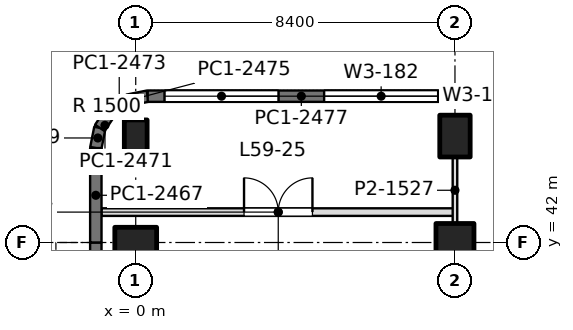
"""IFC4 building model, lengths in metres.
Left out: names, types, materials, properties, quantities, classifications, styles, units other than length and angle.
Written with IfcOpenShell. Run it as: python <this file> out.ifc"""

import sys

from ifc_helpers import new_model, si_unit, direction, frame, frame_2d, origin, origin_2d, place, context, subcontext, project, spatial, rectangle, extrude, element, fill, save


model = new_model("IFC4")
c1 = context("Model", 3, precision=1e-05, world=origin(), true_north=direction((0.0, 1.0)))
c2 = subcontext(c1, "Body", "Model", "MODEL_VIEW")
j1 = project(units=[si_unit("LENGTHUNIT", "METRE"), si_unit("PLANEANGLEUNIT", "RADIAN")], contexts=[c1])
p1 = place(None, origin())
s1 = spatial("IfcSite", under=j1, at=p1, CompositionType="ELEMENT")
p2 = place(p1, origin())
s2 = spatial("IfcBuilding", under=s1, at=p2, CompositionType="ELEMENT")
p3 = place(p2, frame((0.0, 0.0, 259.2)))
s3 = spatial("IfcBuildingStorey", under=s2, at=p3, CompositionType="ELEMENT", Elevation=259.2)
p4 = place(p3, frame((0.0, 42.0, 0.0), z_axis=(0.0, 0.0, 1.0), x_axis=(0.0, 1.0, 0.0)))
e1 = element("IfcColumn", 1, at=p4, inside=s3, PredefinedType="COLUMN", context=c2, shape_type="SweptSolid", body=[
    extrude(rectangle(XDim=0.8, YDim=1.1, at=origin_2d()), origin(), (0.0, 0.0, 1.0), 4.5),
])
p5 = place(p3, frame((0.0, 44.8, 0.0), z_axis=(0.0, 0.0, 1.0), x_axis=(1.0, 0.0, 0.0)))
e2 = element("IfcColumn", 2, at=p5, inside=s3, PredefinedType="COLUMN", context=c2, shape_type="SweptSolid", body=[
    extrude(rectangle(XDim=0.6, YDim=0.85, at=origin_2d()), origin(), (0.0, 0.0, 1.0), 4.5),
])
p6 = place(p3, frame((8.4, 42.0, 0.0), z_axis=(0.0, 0.0, 1.0), x_axis=(1.0, 0.0, 0.0)))
e3 = element("IfcColumn", 3, at=p6, inside=s3, PredefinedType="COLUMN", context=c2, shape_type="SweptSolid", body=[
    extrude(rectangle(XDim=1.0, YDim=1.0, at=origin_2d()), origin(), (0.0, 0.0, 1.0), 4.5),
])
p7 = place(p3, frame((8.4, 44.8, 0.0), z_axis=(0.0, 0.0, 1.0), x_axis=(1.0, 0.0, 0.0)))
e4 = element("IfcColumn", 4, at=p7, inside=s3, PredefinedType="COLUMN", context=c2, shape_type="SweptSolid", body=[
    extrude(rectangle(XDim=0.8, YDim=1.1, at=origin_2d()), origin(), (0.0, 0.0, 1.0), 4.5),
])
p8 = place(p3, frame((-1.05, 37.65, 0.0), z_axis=(0.0, 0.0, 1.0), x_axis=(0.0, 1.0, 0.0)))
e5 = element("IfcWall", 5, at=p8, inside=s3, PredefinedType="SOLIDWALL", context=c2, shape_type="SweptSolid", body=[
    extrude(rectangle(XDim=4.35, YDim=0.3, at=frame_2d((2.175, 0.0))), origin(), (0.0, 0.0, 1.0), 4.35),
])
p9 = place(p8, frame((0.975, 0.0, 0.9)))
e6 = element("IfcOpeningElement", 6, at=p9, cuts=e5, PredefinedType="OPENING", context=c2, shape_type="SweptSolid", body=[
    extrude(rectangle(XDim=2.4, YDim=1.9, at=frame_2d((1.2, 0.95))), frame((0.0, 0.16, 0.0), z_axis=(0.0, -1.0, 0.0), x_axis=(1.0, 0.0, 0.0)), (0.0, 0.0, 1.0), 0.32),
])
p10 = place(p3, frame((-1.05, 42.0, 0.0), z_axis=(0.0, 0.0, 1.0), x_axis=(0.0, 1.0, 0.0)))
e7 = element("IfcWall", 7, at=p10, inside=s3, PredefinedType="SOLIDWALL", context=c2, shape_type="SweptSolid", body=[
    extrude(rectangle(XDim=2.485, YDim=0.3, at=frame_2d((1.243, 0.0))), origin(), (0.0, 0.0, 1.0), 4.35),
])
p11 = place(p3, frame((-1.05, 44.485, 0.0), z_axis=(0.0, 0.0, 1.0), x_axis=(0.195073962632, 0.980788534345, 0.0)))
e8 = element("IfcWall", 8, at=p11, inside=s3, PredefinedType="SOLIDWALL", context=c2, shape_type="SweptSolid", body=[
    extrude(rectangle(XDim=0.541, YDim=0.3, at=frame_2d((0.271, 0.0))), origin(), (0.0, 0.0, 1.0), 4.35),
])
p12 = place(p3, frame((-0.945, 45.015, 0.0), z_axis=(0.0, 0.0, 1.0), x_axis=(0.55534295404, 0.831621430339, 0.0)))
e9 = element("IfcWall", 9, at=p12, inside=s3, PredefinedType="SOLIDWALL", context=c2, shape_type="SweptSolid", body=[
    extrude(rectangle(XDim=0.526, YDim=0.3, at=frame_2d((0.263, 0.0))), origin(), (0.0, 0.0, 1.0), 4.35),
])
p13 = place(p3, frame((-0.653, 45.453, 0.0), z_axis=(0.0, 0.0, 1.0), x_axis=(0.831692711774, 0.555236195849, 0.0)))
e10 = element("IfcWall", 10, at=p13, inside=s3, PredefinedType="SOLIDWALL", context=c2, shape_type="SweptSolid", body=[
    extrude(rectangle(XDim=0.525, YDim=0.3, at=frame_2d((0.263, 0.0))), origin(), (0.0, 0.0, 1.0), 4.35),
])
p14 = place(p3, frame((-0.216, 45.744, 0.0), z_axis=(0.0, 0.0, 1.0), x_axis=(0.980702050465, 0.1955082817, 0.0)))
e11 = element("IfcWall", 11, at=p14, inside=s3, PredefinedType="SOLIDWALL", context=c2, shape_type="SweptSolid", body=[
    extrude(rectangle(XDim=0.541, YDim=0.3, at=frame_2d((0.271, 0.0))), origin(), (0.0, 0.0, 1.0), 4.35),
])
p15 = place(p3, frame((0.315, 45.85, 0.0), z_axis=(0.0, 0.0, 1.0), x_axis=(1.0, 0.0, 0.0)))
e12 = element("IfcWall", 12, at=p15, inside=s3, PredefinedType="SOLIDWALL", context=c2, shape_type="SweptSolid", body=[
    extrude(rectangle(XDim=8.085, YDim=0.3, at=frame_2d((4.042, 0.0))), origin(), (0.0, 0.0, 1.0), 4.35),
])
p16 = place(p15, frame((0.443, 0.0, 0.9)))
e13 = element("IfcOpeningElement", 13, at=p16, cuts=e12, PredefinedType="OPENING", context=c2, shape_type="SweptSolid", body=[
    extrude(rectangle(XDim=3.0, YDim=2.4, at=frame_2d((1.5, 1.2))), frame((0.0, 0.16, 0.0), z_axis=(0.0, -1.0, 0.0), x_axis=(1.0, 0.0, 0.0)), (0.0, 0.0, 1.0), 0.32),
])
p17 = place(p15, frame((4.643, 0.0, 0.9)))
e14 = element("IfcOpeningElement", 14, at=p17, cuts=e12, PredefinedType="OPENING", context=c2, shape_type="SweptSolid", body=[
    extrude(rectangle(XDim=3.0, YDim=2.4, at=frame_2d((1.5, 1.2))), frame((0.0, 0.16, 0.0), z_axis=(0.0, -1.0, 0.0), x_axis=(1.0, 0.0, 0.0)), (0.0, 0.0, 1.0), 0.32),
])
p18 = place(p3, frame((8.4, 45.85, 0.0), z_axis=(0.0, 0.0, 1.0), x_axis=(1.0, 0.0, 0.0)))
e15 = element("IfcWall", 15, at=p18, inside=s3, PredefinedType="SOLIDWALL", context=c2, shape_type="SweptSolid", body=[
    extrude(rectangle(XDim=8.4, YDim=0.3, at=frame_2d((4.2, 0.0))), origin(), (0.0, 0.0, 1.0), 4.35),
])
p19 = place(p18, frame((0.6, 0.0, 0.9)))
e16 = element("IfcOpeningElement", 16, at=p19, cuts=e15, PredefinedType="OPENING", context=c2, shape_type="SweptSolid", body=[
    extrude(rectangle(XDim=3.0, YDim=2.4, at=frame_2d((1.5, 1.2))), frame((0.0, 0.16, 0.0), z_axis=(0.0, -1.0, 0.0), x_axis=(1.0, 0.0, 0.0)), (0.0, 0.0, 1.0), 0.32),
])
p20 = place(p18, frame((4.8, 0.0, 0.9)))
e17 = element("IfcOpeningElement", 17, at=p20, cuts=e15, PredefinedType="OPENING", context=c2, shape_type="SweptSolid", body=[
    extrude(rectangle(XDim=3.0, YDim=2.4, at=frame_2d((1.5, 1.2))), frame((0.0, 0.16, 0.0), z_axis=(0.0, -1.0, 0.0), x_axis=(1.0, 0.0, 0.0)), (0.0, 0.0, 1.0), 0.32),
])
p21 = place(p3, frame((-0.902, 42.8, 0.0), z_axis=(0.0, 0.0, 1.0), x_axis=(1.0, 0.0, 0.0)))
e18 = element("IfcWall", 18, at=p21, inside=s3, PredefinedType="PARTITIONING", context=c2, shape_type="SweptSolid", body=[
    extrude(rectangle(XDim=9.302, YDim=0.2, at=frame_2d((4.651, 0.0))), origin(), (0.0, 0.0, 1.0), 3.86),
])
p22 = place(p21, frame((3.752, 0.0, 0.0)))
e19 = element("IfcOpeningElement", 19, at=p22, cuts=e18, PredefinedType="OPENING", context=c2, shape_type="SweptSolid", body=[
    extrude(rectangle(XDim=1.8, YDim=2.2, at=frame_2d((0.9, 1.1))), frame((0.0, 0.11, 0.0), z_axis=(0.0, -1.0, 0.0), x_axis=(1.0, 0.0, 0.0)), (0.0, 0.0, 1.0), 0.22),
])
p23 = place(p3, frame((8.4, 42.498, 0.0), z_axis=(0.0, 0.0, 1.0), x_axis=(0.0, 1.0, 0.0)))
e20 = element("IfcWall", 20, at=p23, inside=s3, PredefinedType="PARTITIONING", context=c2, shape_type="SweptSolid", body=[
    extrude(rectangle(XDim=1.753, YDim=0.12, at=frame_2d((0.876, 0.0))), origin(), (0.0, 0.0, 1.0), 3.99),
])
p24 = place(p16, origin())
e21 = element("IfcWindow", 21, at=p24, inside=s3, PartitioningType="SINGLE_PANEL", PredefinedType="WINDOW", context=c2, shape_type="SweptSolid", body=[
    extrude(rectangle(XDim=3.0, YDim=2.4, at=frame_2d((1.5, 1.2))), frame((0.0, 0.03, 0.0), z_axis=(0.0, -1.0, 0.0), x_axis=(1.0, 0.0, 0.0)), (0.0, 0.0, 1.0), 0.06),
])
fill(e13, e21)
p25 = place(p17, origin())
e22 = element("IfcWindow", 22, at=p25, inside=s3, PartitioningType="SINGLE_PANEL", PredefinedType="WINDOW", context=c2, shape_type="SweptSolid", body=[
    extrude(rectangle(XDim=3.0, YDim=2.4, at=frame_2d((1.5, 1.2))), frame((0.0, 0.03, 0.0), z_axis=(0.0, -1.0, 0.0), x_axis=(1.0, 0.0, 0.0)), (0.0, 0.0, 1.0), 0.06),
])
fill(e14, e22)
p26 = place(p19, origin())
e23 = element("IfcWindow", 23, at=p26, inside=s3, PartitioningType="SINGLE_PANEL", PredefinedType="WINDOW", context=c2, shape_type="SweptSolid", body=[
    extrude(rectangle(XDim=3.0, YDim=2.4, at=frame_2d((1.5, 1.2))), frame((0.0, 0.03, 0.0), z_axis=(0.0, -1.0, 0.0), x_axis=(1.0, 0.0, 0.0)), (0.0, 0.0, 1.0), 0.06),
])
fill(e16, e23)
p27 = place(p22, origin())
e24 = element("IfcDoor", 24, at=p27, inside=s3, OperationType="DOUBLE_DOOR_SINGLE_SWING", PredefinedType="DOOR", context=c2, shape_type="SweptSolid", body=[
    extrude(rectangle(XDim=1.8, YDim=2.2, at=frame_2d((0.9, 1.1))), frame((0.0, 0.025, 0.0), z_axis=(0.0, -1.0, 0.0), x_axis=(1.0, 0.0, 0.0)), (0.0, 0.0, 1.0), 0.05),
])
fill(e19, e24)
save(model, sys.argv[1])
